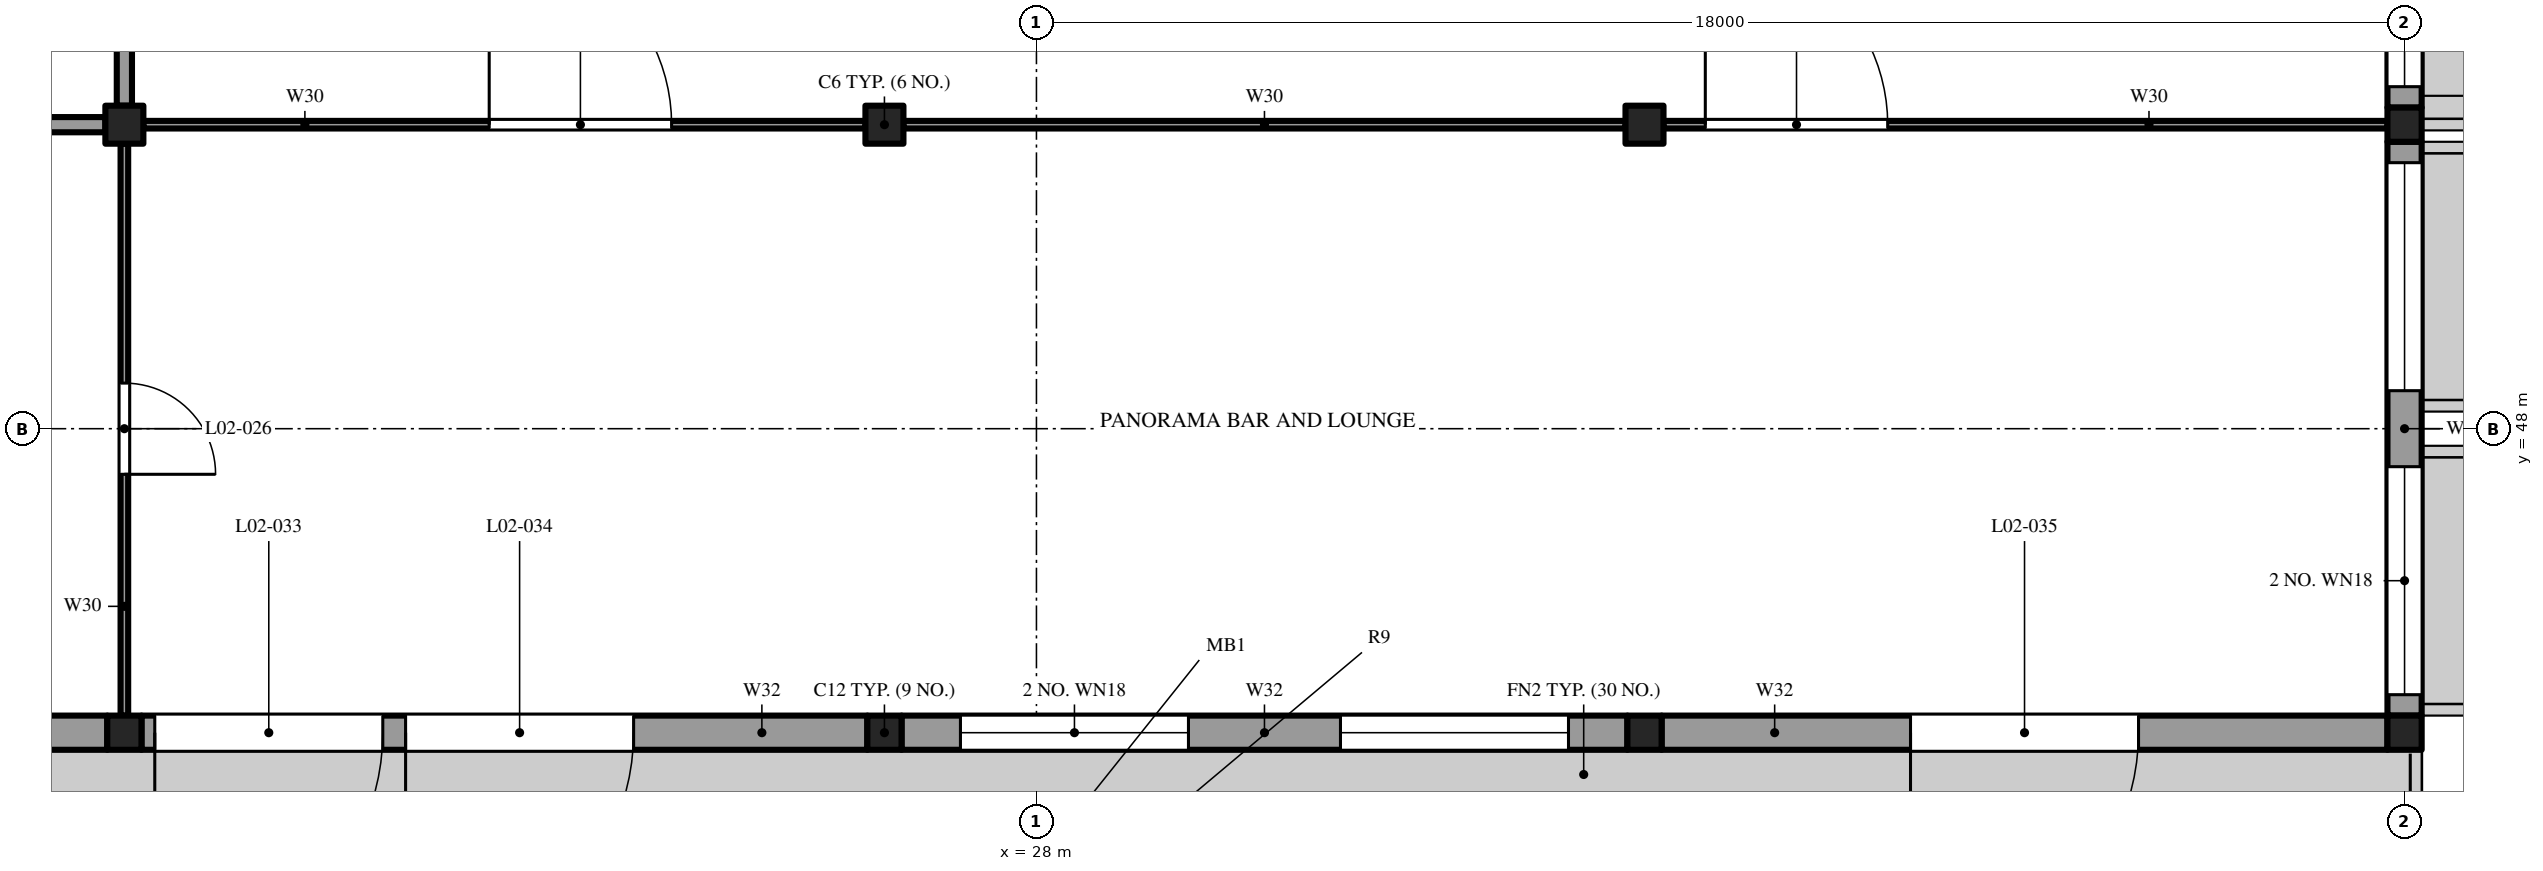
"""IFC4 building model, lengths in metres.
Left out: names, types, materials, properties, quantities, classifications, styles, units other than length and angle.
Written with IfcOpenShell. Run it as: python <this file> out.ifc"""

import sys

from ifc_helpers import new_model, si_unit, direction, frame, frame_2d, origin, origin_2d, place, context, subcontext, project, spatial, rectangle, extrude, element, fill, save


model = new_model("IFC4")
c1 = context("Model", 3, precision=1e-05, world=origin(), true_north=direction((0.0, 1.0)))
c2 = subcontext(c1, "Body", "Model", "MODEL_VIEW")
j1 = project(units=[si_unit("LENGTHUNIT", "METRE"), si_unit("PLANEANGLEUNIT", "RADIAN")], contexts=[c1])
p1 = place(None, origin())
s1 = spatial("IfcSite", under=j1, at=p1, CompositionType="ELEMENT")
p2 = place(p1, origin())
s2 = spatial("IfcBuilding", under=s1, at=p2, CompositionType="ELEMENT")
p3 = place(p2, frame((0.0, 0.0, 12.0)))
s3 = spatial("IfcBuildingStorey", under=s2, at=p3, CompositionType="ELEMENT", Elevation=12.0)
p4 = place(p3, frame((16.0, 44.0, 0.0), z_axis=(0.0, 0.0, 1.0), x_axis=(1.0, 0.0, 0.0)))
e1 = element("IfcColumn", 1, at=p4, inside=s3, PredefinedType="COLUMN", context=c2, shape_type="SweptSolid", body=[
    extrude(rectangle(XDim=0.45, YDim=0.45, at=origin_2d()), origin(), (0.0, 0.0, 1.0), 4.8),
])
p5 = place(p3, frame((16.0, 52.0, 0.0), z_axis=(0.0, 0.0, 1.0), x_axis=(1.0, 0.0, 0.0)))
e2 = element("IfcColumn", 2, at=p5, inside=s3, PredefinedType="COLUMN", context=c2, shape_type="SweptSolid", body=[
    extrude(rectangle(XDim=0.5, YDim=0.5, at=origin_2d()), origin(), (0.0, 0.0, 1.0), 4.8),
])
p6 = place(p3, frame((26.0, 44.0, 0.0), z_axis=(0.0, 0.0, 1.0), x_axis=(1.0, 0.0, 0.0)))
e3 = element("IfcColumn", 3, at=p6, inside=s3, PredefinedType="COLUMN", context=c2, shape_type="SweptSolid", body=[
    extrude(rectangle(XDim=0.45, YDim=0.45, at=origin_2d()), origin(), (0.0, 0.0, 1.0), 4.8),
])
p7 = place(p3, frame((26.0, 52.0, 0.0), z_axis=(0.0, 0.0, 1.0), x_axis=(1.0, 0.0, 0.0)))
e4 = element("IfcColumn", 4, at=p7, inside=s3, PredefinedType="COLUMN", context=c2, shape_type="SweptSolid", body=[
    extrude(rectangle(XDim=0.5, YDim=0.5, at=origin_2d()), origin(), (0.0, 0.0, 1.0), 4.8),
])
p8 = place(p3, frame((36.0, 44.0, 0.0), z_axis=(0.0, 0.0, 1.0), x_axis=(1.0, 0.0, 0.0)))
e5 = element("IfcColumn", 5, at=p8, inside=s3, PredefinedType="COLUMN", context=c2, shape_type="SweptSolid", body=[
    extrude(rectangle(XDim=0.45, YDim=0.45, at=origin_2d()), origin(), (0.0, 0.0, 1.0), 4.8),
])
p9 = place(p3, frame((36.0, 52.0, 0.0), z_axis=(0.0, 0.0, 1.0), x_axis=(1.0, 0.0, 0.0)))
e6 = element("IfcColumn", 6, at=p9, inside=s3, PredefinedType="COLUMN", context=c2, shape_type="SweptSolid", body=[
    extrude(rectangle(XDim=0.5, YDim=0.5, at=origin_2d()), origin(), (0.0, 0.0, 1.0), 4.8),
])
for number, where, z_axis, x_axis in (
    (7, (46.0, 44.0, 0.0), (0.0, 0.0, 1.0), (1.0, 0.0, 0.0)),
    (8, (46.0, 52.0, 0.0), (0.0, 0.0, 1.0), (1.0, 0.0, 0.0)),
):
    element("IfcColumn", number, at=place(p3, frame(where, z_axis=z_axis, x_axis=x_axis)), inside=s3, PredefinedType="COLUMN", context=c2, shape_type="SweptSolid", body=[
        extrude(rectangle(XDim=0.45, YDim=0.45, at=origin_2d()), origin(), (0.0, 0.0, 1.0), 4.8),
    ])
p10 = place(p3, frame((6.225, 44.0, 0.0), z_axis=(0.0, 0.0, 1.0), x_axis=(1.0, 0.0, 0.0)))
e9 = element("IfcWall", 9, at=p10, inside=s3, PredefinedType="SOLIDWALL", context=c2, shape_type="SweptSolid", body=[
    extrude(rectangle(XDim=9.55, YDim=0.45, at=frame_2d((4.775, 0.0))), origin(), (0.0, 0.0, 1.0), 4.45),
])
p11 = place(p10, frame((0.775, 0.0, 0.6)))
e10 = element("IfcOpeningElement", 10, at=p11, cuts=e9, PredefinedType="OPENING", context=c2, shape_type="SweptSolid", body=[
    extrude(rectangle(XDim=3.0, YDim=3.2, at=frame_2d((1.5, 1.6))), frame((0.0, 0.235, 0.0), z_axis=(0.0, -1.0, 0.0), x_axis=(1.0, 0.0, 0.0)), (0.0, 0.0, 1.0), 0.47),
])
p12 = place(p10, frame((5.775, 0.0, 0.6)))
e11 = element("IfcOpeningElement", 11, at=p12, cuts=e9, PredefinedType="OPENING", context=c2, shape_type="SweptSolid", body=[
    extrude(rectangle(XDim=3.0, YDim=3.2, at=frame_2d((1.5, 1.6))), frame((0.0, 0.235, 0.0), z_axis=(0.0, -1.0, 0.0), x_axis=(1.0, 0.0, 0.0)), (0.0, 0.0, 1.0), 0.47),
])
p13 = place(p3, frame((16.225, 44.0, 0.0), z_axis=(0.0, 0.0, 1.0), x_axis=(1.0, 0.0, 0.0)))
e12 = element("IfcWall", 12, at=p13, inside=s3, PredefinedType="SOLIDWALL", context=c2, shape_type="SweptSolid", body=[
    extrude(rectangle(XDim=9.55, YDim=0.45, at=frame_2d((4.775, 0.0))), origin(), (0.0, 0.0, 1.0), 4.45),
])
p14 = place(p13, frame((0.175, 0.0, 0.0)))
e13 = element("IfcOpeningElement", 13, at=p14, cuts=e12, PredefinedType="OPENING", context=c2, shape_type="SweptSolid", body=[
    extrude(rectangle(XDim=3.0, YDim=2.4, at=frame_2d((1.5, 1.2))), frame((0.0, 0.235, 0.0), z_axis=(0.0, -1.0, 0.0), x_axis=(1.0, 0.0, 0.0)), (0.0, 0.0, 1.0), 0.47),
])
p15 = place(p13, frame((3.475, 0.0, 0.0)))
e14 = element("IfcOpeningElement", 14, at=p15, cuts=e12, PredefinedType="OPENING", context=c2, shape_type="SweptSolid", body=[
    extrude(rectangle(XDim=3.0, YDim=2.4, at=frame_2d((1.5, 1.2))), frame((0.0, 0.235, 0.0), z_axis=(0.0, -1.0, 0.0), x_axis=(1.0, 0.0, 0.0)), (0.0, 0.0, 1.0), 0.47),
])
p16 = place(p3, frame((26.225, 44.0, 0.0), z_axis=(0.0, 0.0, 1.0), x_axis=(1.0, 0.0, 0.0)))
e15 = element("IfcWall", 15, at=p16, inside=s3, PredefinedType="SOLIDWALL", context=c2, shape_type="SweptSolid", body=[
    extrude(rectangle(XDim=9.55, YDim=0.45, at=frame_2d((4.775, 0.0))), origin(), (0.0, 0.0, 1.0), 4.45),
])
p17 = place(p16, frame((0.775, 0.0, 0.6)))
e16 = element("IfcOpeningElement", 16, at=p17, cuts=e15, PredefinedType="OPENING", context=c2, shape_type="SweptSolid", body=[
    extrude(rectangle(XDim=3.0, YDim=3.2, at=frame_2d((1.5, 1.6))), frame((0.0, 0.235, 0.0), z_axis=(0.0, -1.0, 0.0), x_axis=(1.0, 0.0, 0.0)), (0.0, 0.0, 1.0), 0.47),
])
p18 = place(p16, frame((5.775, 0.0, 0.6)))
e17 = element("IfcOpeningElement", 17, at=p18, cuts=e15, PredefinedType="OPENING", context=c2, shape_type="SweptSolid", body=[
    extrude(rectangle(XDim=3.0, YDim=3.2, at=frame_2d((1.5, 1.6))), frame((0.0, 0.235, 0.0), z_axis=(0.0, -1.0, 0.0), x_axis=(1.0, 0.0, 0.0)), (0.0, 0.0, 1.0), 0.47),
])
p19 = place(p3, frame((36.225, 44.0, 0.0), z_axis=(0.0, 0.0, 1.0), x_axis=(1.0, 0.0, 0.0)))
e18 = element("IfcWall", 18, at=p19, inside=s3, PredefinedType="SOLIDWALL", context=c2, shape_type="SweptSolid", body=[
    extrude(rectangle(XDim=9.55, YDim=0.45, at=frame_2d((4.775, 0.0))), origin(), (0.0, 0.0, 1.0), 4.45),
])
p20 = place(p19, frame((3.275, 0.0, 0.0)))
e19 = element("IfcOpeningElement", 19, at=p20, cuts=e18, PredefinedType="OPENING", context=c2, shape_type="SweptSolid", body=[
    extrude(rectangle(XDim=3.0, YDim=2.4, at=frame_2d((1.5, 1.2))), frame((0.0, 0.235, 0.0), z_axis=(0.0, -1.0, 0.0), x_axis=(1.0, 0.0, 0.0)), (0.0, 0.0, 1.0), 0.47),
])
p21 = place(p3, frame((6.225, 52.0, 0.0), z_axis=(0.0, 0.0, 1.0), x_axis=(1.0, 0.0, 0.0)))
e20 = element("IfcWall", 20, at=p21, inside=s3, PredefinedType="SOLIDWALL", context=c2, shape_type="SweptSolid", body=[
    extrude(rectangle(XDim=9.525, YDim=0.2, at=frame_2d((4.762, 0.0))), origin(), (0.0, 0.0, 1.0), 4.45),
])
p22 = place(p21, frame((4.175, 0.0, 0.0)))
e21 = element("IfcOpeningElement", 21, at=p22, cuts=e20, PredefinedType="OPENING", context=c2, shape_type="SweptSolid", body=[
    extrude(rectangle(XDim=1.2, YDim=2.1, at=frame_2d((0.6, 1.05))), frame((0.0, 0.11, 0.0), z_axis=(0.0, -1.0, 0.0), x_axis=(1.0, 0.0, 0.0)), (0.0, 0.0, 1.0), 0.22),
])
p23 = place(p3, frame((16.25, 52.0, 0.0), z_axis=(0.0, 0.0, 1.0), x_axis=(1.0, 0.0, 0.0)))
e22 = element("IfcWall", 22, at=p23, inside=s3, PredefinedType="PARTITIONING", context=c2, shape_type="SweptSolid", body=[
    extrude(rectangle(XDim=9.5, YDim=0.1, at=frame_2d((4.75, 0.0))), origin(), (0.0, 0.0, 1.0), 4.45),
])
p24 = place(p23, frame((4.55, 0.0, 0.0)))
e23 = element("IfcOpeningElement", 23, at=p24, cuts=e22, PredefinedType="OPENING", context=c2, shape_type="SweptSolid", body=[
    extrude(rectangle(XDim=2.4, YDim=2.1, at=frame_2d((1.2, 1.05))), frame((0.0, 0.06, 0.0), z_axis=(0.0, -1.0, 0.0), x_axis=(1.0, 0.0, 0.0)), (0.0, 0.0, 1.0), 0.12),
])
p25 = place(p3, frame((26.25, 52.0, 0.0), z_axis=(0.0, 0.0, 1.0), x_axis=(1.0, 0.0, 0.0)))
e24 = element("IfcWall", 24, at=p25, inside=s3, PredefinedType="PARTITIONING", context=c2, shape_type="SweptSolid", body=[
    extrude(rectangle(XDim=9.5, YDim=0.1, at=frame_2d((4.75, 0.0))), origin(), (0.0, 0.0, 1.0), 4.45),
])
p26 = place(p3, frame((36.25, 52.0, 0.0), z_axis=(0.0, 0.0, 1.0), x_axis=(1.0, 0.0, 0.0)))
e25 = element("IfcWall", 25, at=p26, inside=s3, PredefinedType="PARTITIONING", context=c2, shape_type="SweptSolid", body=[
    extrude(rectangle(XDim=9.525, YDim=0.1, at=frame_2d((4.762, 0.0))), origin(), (0.0, 0.0, 1.0), 4.45),
])
p27 = place(p26, frame((0.55, 0.0, 0.0)))
e26 = element("IfcOpeningElement", 26, at=p27, cuts=e25, PredefinedType="OPENING", context=c2, shape_type="SweptSolid", body=[
    extrude(rectangle(XDim=2.4, YDim=2.1, at=frame_2d((1.2, 1.05))), frame((0.0, 0.06, 0.0), z_axis=(0.0, -1.0, 0.0), x_axis=(1.0, 0.0, 0.0)), (0.0, 0.0, 1.0), 0.12),
])
p28 = place(p3, frame((16.0, 44.225, 0.0), z_axis=(0.0, 0.0, 1.0), x_axis=(0.0, 1.0, 0.0)))
e27 = element("IfcWall", 27, at=p28, inside=s3, PredefinedType="PARTITIONING", context=c2, shape_type="SweptSolid", body=[
    extrude(rectangle(XDim=7.525, YDim=0.1, at=frame_2d((3.762, 0.0))), origin(), (0.0, 0.0, 1.0), 4.45),
])
p29 = place(p28, frame((3.175, 0.0, 0.0)))
e28 = element("IfcOpeningElement", 28, at=p29, cuts=e27, PredefinedType="OPENING", context=c2, shape_type="SweptSolid", body=[
    extrude(rectangle(XDim=1.2, YDim=2.1, at=frame_2d((0.6, 1.05))), frame((0.0, 0.06, 0.0), z_axis=(0.0, -1.0, 0.0), x_axis=(1.0, 0.0, 0.0)), (0.0, 0.0, 1.0), 0.12),
])
p30 = place(p3, frame((16.0, 52.25, 0.0), z_axis=(0.0, 0.0, 1.0), x_axis=(0.0, 1.0, 0.0)))
e29 = element("IfcWall", 29, at=p30, inside=s3, PredefinedType="SOLIDWALL", context=c2, shape_type="SweptSolid", body=[
    extrude(rectangle(XDim=7.5, YDim=0.2, at=frame_2d((3.75, 0.0))), origin(), (0.0, 0.0, 1.0), 4.45),
])
p31 = place(p30, frame((5.15, 0.0, 0.0)))
e30 = element("IfcOpeningElement", 30, at=p31, cuts=e29, PredefinedType="OPENING", context=c2, shape_type="SweptSolid", body=[
    extrude(rectangle(XDim=1.2, YDim=2.1, at=frame_2d((0.6, 1.05))), frame((0.0, 0.11, 0.0), z_axis=(0.0, -1.0, 0.0), x_axis=(1.0, 0.0, 0.0)), (0.0, 0.0, 1.0), 0.22),
])
p32 = place(p3, frame((46.0, 44.225, 0.0), z_axis=(0.0, 0.0, 1.0), x_axis=(0.0, 1.0, 0.0)))
e31 = element("IfcWall", 31, at=p32, inside=s3, PredefinedType="SOLIDWALL", context=c2, shape_type="SweptSolid", body=[
    extrude(rectangle(XDim=7.55, YDim=0.45, at=frame_2d((3.775, 0.0))), origin(), (0.0, 0.0, 1.0), 4.45),
])
p33 = place(p32, frame((0.275, 0.0, 0.6)))
e32 = element("IfcOpeningElement", 32, at=p33, cuts=e31, PredefinedType="OPENING", context=c2, shape_type="SweptSolid", body=[
    extrude(rectangle(XDim=3.0, YDim=3.2, at=frame_2d((1.5, 1.6))), frame((0.0, 0.235, 0.0), z_axis=(0.0, -1.0, 0.0), x_axis=(1.0, 0.0, 0.0)), (0.0, 0.0, 1.0), 0.47),
])
p34 = place(p32, frame((4.275, 0.0, 0.6)))
e33 = element("IfcOpeningElement", 33, at=p34, cuts=e31, PredefinedType="OPENING", context=c2, shape_type="SweptSolid", body=[
    extrude(rectangle(XDim=3.0, YDim=3.2, at=frame_2d((1.5, 1.6))), frame((0.0, 0.235, 0.0), z_axis=(0.0, -1.0, 0.0), x_axis=(1.0, 0.0, 0.0)), (0.0, 0.0, 1.0), 0.47),
])
p35 = place(p3, frame((46.0, 52.225, 0.0), z_axis=(0.0, 0.0, 1.0), x_axis=(0.0, 1.0, 0.0)))
e34 = element("IfcWall", 34, at=p35, inside=s3, PredefinedType="SOLIDWALL", context=c2, shape_type="SweptSolid", body=[
    extrude(rectangle(XDim=7.55, YDim=0.45, at=frame_2d((3.775, 0.0))), origin(), (0.0, 0.0, 1.0), 4.45),
])
p36 = place(p35, frame((0.275, 0.0, 0.6)))
e35 = element("IfcOpeningElement", 35, at=p36, cuts=e34, PredefinedType="OPENING", context=c2, shape_type="SweptSolid", body=[
    extrude(rectangle(XDim=3.0, YDim=3.2, at=frame_2d((1.5, 1.6))), frame((0.0, 0.235, 0.0), z_axis=(0.0, -1.0, 0.0), x_axis=(1.0, 0.0, 0.0)), (0.0, 0.0, 1.0), 0.47),
])
p37 = place(p35, frame((4.275, 0.0, 0.6)))
e36 = element("IfcOpeningElement", 36, at=p37, cuts=e34, PredefinedType="OPENING", context=c2, shape_type="SweptSolid", body=[
    extrude(rectangle(XDim=3.0, YDim=3.2, at=frame_2d((1.5, 1.6))), frame((0.0, 0.235, 0.0), z_axis=(0.0, -1.0, 0.0), x_axis=(1.0, 0.0, 0.0)), (0.0, 0.0, 1.0), 0.47),
])
p38 = place(p29, frame((1.2, 0.0, 0.0), z_axis=(0.0, 0.0, 1.0), x_axis=(-1.0, 0.0, 0.0)))
e37 = element("IfcDoor", 37, at=p38, inside=s3, OperationType="SINGLE_SWING_RIGHT", PredefinedType="DOOR", context=c2, shape_type="SweptSolid", body=[
    extrude(rectangle(XDim=1.2, YDim=2.1, at=frame_2d((0.6, 1.05))), frame((0.0, 0.025, 0.0), z_axis=(0.0, -1.0, 0.0), x_axis=(1.0, 0.0, 0.0)), (0.0, 0.0, 1.0), 0.05),
])
fill(e28, e37)
p39 = place(p24, origin())
e38 = element("IfcDoor", 38, at=p39, inside=s3, OperationType="DOUBLE_DOOR_SINGLE_SWING", PredefinedType="DOOR", context=c2, shape_type="SweptSolid", body=[
    extrude(rectangle(XDim=2.4, YDim=2.1, at=frame_2d((1.2, 1.05))), frame((0.0, 0.025, 0.0), z_axis=(0.0, -1.0, 0.0), x_axis=(1.0, 0.0, 0.0)), (0.0, 0.0, 1.0), 0.05),
])
fill(e23, e38)
p40 = place(p27, origin())
e39 = element("IfcDoor", 39, at=p40, inside=s3, OperationType="DOUBLE_DOOR_SINGLE_SWING", PredefinedType="DOOR", context=c2, shape_type="SweptSolid", body=[
    extrude(rectangle(XDim=2.4, YDim=2.1, at=frame_2d((1.2, 1.05))), frame((0.0, 0.025, 0.0), z_axis=(0.0, -1.0, 0.0), x_axis=(1.0, 0.0, 0.0)), (0.0, 0.0, 1.0), 0.05),
])
fill(e26, e39)
p41 = place(p14, frame((3.0, 0.0, 0.0), z_axis=(0.0, 0.0, 1.0), x_axis=(-1.0, 0.0, 0.0)))
e40 = element("IfcDoor", 40, at=p41, inside=s3, OperationType="DOUBLE_DOOR_SINGLE_SWING", PredefinedType="DOOR", context=c2, shape_type="SweptSolid", body=[
    extrude(rectangle(XDim=3.0, YDim=2.4, at=frame_2d((1.5, 1.2))), frame((0.0, 0.025, 0.0), z_axis=(0.0, -1.0, 0.0), x_axis=(1.0, 0.0, 0.0)), (0.0, 0.0, 1.0), 0.05),
])
fill(e13, e40)
p42 = place(p15, frame((3.0, 0.0, 0.0), z_axis=(0.0, 0.0, 1.0), x_axis=(-1.0, 0.0, 0.0)))
e41 = element("IfcDoor", 41, at=p42, inside=s3, OperationType="DOUBLE_DOOR_SINGLE_SWING", PredefinedType="DOOR", context=c2, shape_type="SweptSolid", body=[
    extrude(rectangle(XDim=3.0, YDim=2.4, at=frame_2d((1.5, 1.2))), frame((0.0, 0.025, 0.0), z_axis=(0.0, -1.0, 0.0), x_axis=(1.0, 0.0, 0.0)), (0.0, 0.0, 1.0), 0.05),
])
fill(e14, e41)
p43 = place(p20, frame((3.0, 0.0, 0.0), z_axis=(0.0, 0.0, 1.0), x_axis=(-1.0, 0.0, 0.0)))
e42 = element("IfcDoor", 42, at=p43, inside=s3, OperationType="DOUBLE_DOOR_SINGLE_SWING", PredefinedType="DOOR", context=c2, shape_type="SweptSolid", body=[
    extrude(rectangle(XDim=3.0, YDim=2.4, at=frame_2d((1.5, 1.2))), frame((0.0, 0.025, 0.0), z_axis=(0.0, -1.0, 0.0), x_axis=(1.0, 0.0, 0.0)), (0.0, 0.0, 1.0), 0.05),
])
fill(e19, e42)
p44 = place(p17, origin())
e43 = element("IfcWindow", 43, at=p44, inside=s3, PartitioningType="SINGLE_PANEL", PredefinedType="WINDOW", context=c2, shape_type="SweptSolid", body=[
    extrude(rectangle(XDim=3.0, YDim=3.2, at=frame_2d((1.5, 1.6))), frame((0.0, 0.215, 0.0), z_axis=(0.0, -1.0, 0.0), x_axis=(1.0, 0.0, 0.0)), (0.0, 0.0, 1.0), 0.06),
])
fill(e16, e43)
p45 = place(p18, origin())
e44 = element("IfcWindow", 44, at=p45, inside=s3, PartitioningType="SINGLE_PANEL", PredefinedType="WINDOW", context=c2, shape_type="SweptSolid", body=[
    extrude(rectangle(XDim=3.0, YDim=3.2, at=frame_2d((1.5, 1.6))), frame((0.0, 0.215, 0.0), z_axis=(0.0, -1.0, 0.0), x_axis=(1.0, 0.0, 0.0)), (0.0, 0.0, 1.0), 0.06),
])
fill(e17, e44)
p46 = place(p33, origin())
e45 = element("IfcWindow", 45, at=p46, inside=s3, PartitioningType="SINGLE_PANEL", PredefinedType="WINDOW", context=c2, shape_type="SweptSolid", body=[
    extrude(rectangle(XDim=3.0, YDim=3.2, at=frame_2d((1.5, 1.6))), frame((0.0, 0.215, 0.0), z_axis=(0.0, -1.0, 0.0), x_axis=(1.0, 0.0, 0.0)), (0.0, 0.0, 1.0), 0.06),
])
fill(e32, e45)
p47 = place(p34, origin())
e46 = element("IfcWindow", 46, at=p47, inside=s3, PartitioningType="SINGLE_PANEL", PredefinedType="WINDOW", context=c2, shape_type="SweptSolid", body=[
    extrude(rectangle(XDim=3.0, YDim=3.2, at=frame_2d((1.5, 1.6))), frame((0.0, 0.215, 0.0), z_axis=(0.0, -1.0, 0.0), x_axis=(1.0, 0.0, 0.0)), (0.0, 0.0, 1.0), 0.06),
])
fill(e33, e46)
p48 = place(p36, origin())
e47 = element("IfcWindow", 47, at=p48, inside=s3, PartitioningType="SINGLE_PANEL", PredefinedType="WINDOW", context=c2, shape_type="SweptSolid", body=[
    extrude(rectangle(XDim=3.0, YDim=3.2, at=frame_2d((1.5, 1.6))), frame((0.0, 0.215, 0.0), z_axis=(0.0, -1.0, 0.0), x_axis=(1.0, 0.0, 0.0)), (0.0, 0.0, 1.0), 0.06),
])
fill(e35, e47)
save(model, sys.argv[1])
